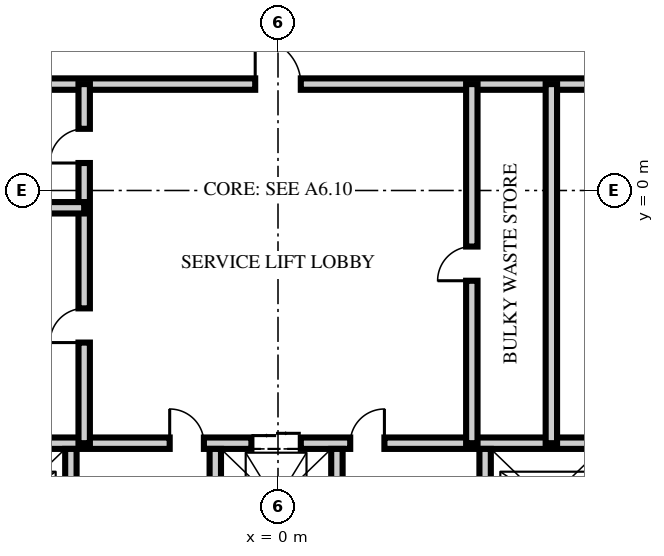
"""IFC4 building model, lengths in metres.
Left out: names, types, materials, properties, quantities, classifications, styles, units other than length and angle.
Written with IfcOpenShell. Run it as: python <this file> out.ifc"""

import sys

from ifc_helpers import new_model, si_unit, direction, frame, frame_2d, origin, place, context, subcontext, project, spatial, rectangle, extrude, element, fill, save


model = new_model("IFC4")
c1 = context("Model", 3, precision=1e-05, world=origin(), true_north=direction((0.0, 1.0)))
c2 = subcontext(c1, "Body", "Model", "MODEL_VIEW")
j1 = project(units=[si_unit("LENGTHUNIT", "METRE"), si_unit("PLANEANGLEUNIT", "RADIAN")], contexts=[c1])
p1 = place(None, origin())
s1 = spatial("IfcSite", under=j1, at=p1, CompositionType="ELEMENT")
p2 = place(p1, origin())
s2 = spatial("IfcBuilding", under=s1, at=p2, CompositionType="ELEMENT")
p3 = place(p2, frame((0.0, 0.0, 285.75)))
s3 = spatial("IfcBuildingStorey", under=s2, at=p3, CompositionType="ELEMENT", Elevation=285.75)
p4 = place(p3, frame((-8.5, -6.65, 0.0), z_axis=(0.0, 0.0, 1.0), x_axis=(1.0, 0.0, 0.0)))
e1 = element("IfcWall", 1, at=p4, inside=s3, PredefinedType="PARTITIONING", context=c2, shape_type="SweptSolid", body=[
    extrude(rectangle(XDim=17.0, YDim=0.3, at=frame_2d((8.5, 0.0))), origin(), (0.0, 0.0, 1.0), 3.5),
])
p5 = place(p4, frame((7.8, 0.0, 0.0)))
e2 = element("IfcOpeningElement", 2, at=p5, cuts=e1, PredefinedType="OPENING", context=c2, shape_type="SweptSolid", body=[
    extrude(rectangle(XDim=1.3, YDim=2.4, at=frame_2d((0.65, 1.2))), frame((0.0, 0.16, 0.0), z_axis=(0.0, -1.0, 0.0), x_axis=(1.0, 0.0, 0.0)), (0.0, 0.0, 1.0), 0.32),
])
p6 = place(p4, frame((5.65, 0.0, 0.0)))
e3 = element("IfcOpeningElement", 3, at=p6, cuts=e1, PredefinedType="OPENING", context=c2, shape_type="SweptSolid", body=[
    extrude(rectangle(XDim=0.9, YDim=2.1, at=frame_2d((0.45, 1.05))), frame((0.0, 0.16, 0.0), z_axis=(0.0, -1.0, 0.0), x_axis=(1.0, 0.0, 0.0)), (0.0, 0.0, 1.0), 0.32),
])
p7 = place(p4, frame((10.4, 0.0, 0.0)))
e4 = element("IfcOpeningElement", 4, at=p7, cuts=e1, PredefinedType="OPENING", context=c2, shape_type="SweptSolid", body=[
    extrude(rectangle(XDim=0.9, YDim=2.1, at=frame_2d((0.45, 1.05))), frame((0.0, 0.16, 0.0), z_axis=(0.0, -1.0, 0.0), x_axis=(1.0, 0.0, 0.0)), (0.0, 0.0, 1.0), 0.32),
])
for number, where, z_axis, x_axis in (
    (5, (-5.45, -11.35, 0.0), (0.0, 0.0, 1.0), (0.0, 1.0, 0.0)),
    (6, (-1.65, -11.35, 0.0), (0.0, 0.0, 1.0), (0.0, 1.0, 0.0)),
    (7, (1.55, -11.35, 0.0), (0.0, 0.0, 1.0), (0.0, 1.0, 0.0)),
    (8, (5.45, -11.35, 0.0), (0.0, 0.0, 1.0), (0.0, 1.0, 0.0)),
):
    element("IfcWall", number, at=place(p3, frame(where, z_axis=z_axis, x_axis=x_axis)), inside=s3, PredefinedType="PARTITIONING", context=c2, shape_type="SweptSolid", body=[
        extrude(rectangle(XDim=4.55, YDim=0.3, at=frame_2d((2.275, 0.0))), origin(), (0.0, 0.0, 1.0), 3.5),
    ])
p8 = place(p3, frame((-10.65, 2.8, 0.0), z_axis=(0.0, 0.0, 1.0), x_axis=(1.0, 0.0, 0.0)))
e9 = element("IfcWall", 9, at=p8, inside=s3, PredefinedType="PARTITIONING", context=c2, shape_type="SweptSolid", body=[
    extrude(rectangle(XDim=21.3, YDim=0.3, at=frame_2d((10.65, 0.0))), origin(), (0.0, 0.0, 1.0), 3.5),
])
p9 = place(p8, frame((10.05, 0.0, 0.0)))
e10 = element("IfcOpeningElement", 10, at=p9, cuts=e9, PredefinedType="OPENING", context=c2, shape_type="SweptSolid", body=[
    extrude(rectangle(XDim=1.2, YDim=2.1, at=frame_2d((0.6, 1.05))), frame((0.0, 0.16, 0.0), z_axis=(0.0, -1.0, 0.0), x_axis=(1.0, 0.0, 0.0)), (0.0, 0.0, 1.0), 0.32),
])
p10 = place(p8, frame((19.121, 0.0, 0.0)))
e11 = element("IfcOpeningElement", 11, at=p10, cuts=e9, PredefinedType="OPENING", context=c2, shape_type="SweptSolid", body=[
    extrude(rectangle(XDim=0.9, YDim=2.1, at=frame_2d((0.45, 1.05))), frame((0.0, 0.16, 0.0), z_axis=(0.0, -1.0, 0.0), x_axis=(1.0, 0.0, 0.0)), (0.0, 0.0, 1.0), 0.32),
])
p11 = place(p3, frame((-5.1, -6.65, 0.0), z_axis=(0.0, 0.0, 1.0), x_axis=(0.0, 1.0, 0.0)))
e12 = element("IfcWall", 12, at=p11, inside=s3, PredefinedType="PARTITIONING", context=c2, shape_type="SweptSolid", body=[
    extrude(rectangle(XDim=9.45, YDim=0.3, at=frame_2d((4.725, 0.0))), origin(), (0.0, 0.0, 1.0), 3.5),
])
p12 = place(p11, frame((2.648, 0.0, 0.0)))
e13 = element("IfcOpeningElement", 13, at=p12, cuts=e12, PredefinedType="OPENING", context=c2, shape_type="SweptSolid", body=[
    extrude(rectangle(XDim=0.9, YDim=2.1, at=frame_2d((0.45, 1.05))), frame((0.0, 0.16, 0.0), z_axis=(0.0, -1.0, 0.0), x_axis=(1.0, 0.0, 0.0)), (0.0, 0.0, 1.0), 0.32),
])
p13 = place(p11, frame((7.373, 0.0, 0.0)))
e14 = element("IfcOpeningElement", 14, at=p13, cuts=e12, PredefinedType="OPENING", context=c2, shape_type="SweptSolid", body=[
    extrude(rectangle(XDim=0.9, YDim=2.1, at=frame_2d((0.45, 1.05))), frame((0.0, 0.16, 0.0), z_axis=(0.0, -1.0, 0.0), x_axis=(1.0, 0.0, 0.0)), (0.0, 0.0, 1.0), 0.32),
])
p14 = place(p3, frame((5.1, -6.65, 0.0), z_axis=(0.0, 0.0, 1.0), x_axis=(0.0, 1.0, 0.0)))
e15 = element("IfcWall", 15, at=p14, inside=s3, PredefinedType="PARTITIONING", context=c2, shape_type="SweptSolid", body=[
    extrude(rectangle(XDim=9.45, YDim=0.3, at=frame_2d((4.725, 0.0))), origin(), (0.0, 0.0, 1.0), 3.5),
])
p15 = place(p14, frame((4.275, 0.0, 0.0)))
e16 = element("IfcOpeningElement", 16, at=p15, cuts=e15, PredefinedType="OPENING", context=c2, shape_type="SweptSolid", body=[
    extrude(rectangle(XDim=0.9, YDim=2.1, at=frame_2d((0.45, 1.05))), frame((0.0, 0.16, 0.0), z_axis=(0.0, -1.0, 0.0), x_axis=(1.0, 0.0, 0.0)), (0.0, 0.0, 1.0), 0.32),
])
p16 = place(p3, frame((-10.65, -0.455, 0.0), z_axis=(0.0, 0.0, 1.0), x_axis=(1.0, 0.0, 0.0)))
e17 = element("IfcWall", 17, at=p16, inside=s3, PredefinedType="PARTITIONING", context=c2, shape_type="SweptSolid", body=[
    extrude(rectangle(XDim=5.55, YDim=0.3, at=frame_2d((2.775, 0.0))), origin(), (0.0, 0.0, 1.0), 3.5),
])
p17 = place(p3, frame((7.193, -6.65, 0.0), z_axis=(0.0, 0.0, 1.0), x_axis=(0.0, 1.0, 0.0)))
e18 = element("IfcWall", 18, at=p17, inside=s3, PredefinedType="PARTITIONING", context=c2, shape_type="SweptSolid", body=[
    extrude(rectangle(XDim=9.45, YDim=0.3, at=frame_2d((4.725, 0.0))), origin(), (0.0, 0.0, 1.0), 3.5),
])
p18 = place(p5, origin())
e19 = element("IfcDoor", 19, at=p18, inside=s3, OperationType="DOUBLE_DOOR_SLIDING", PredefinedType="DOOR", context=c2, shape_type="SweptSolid", body=[
    extrude(rectangle(XDim=1.3, YDim=2.4, at=frame_2d((0.65, 1.2))), frame((0.0, 0.025, 0.0), z_axis=(0.0, -1.0, 0.0), x_axis=(1.0, 0.0, 0.0)), (0.0, 0.0, 1.0), 0.05),
])
fill(e2, e19)
p19 = place(p9, origin())
e20 = element("IfcDoor", 20, at=p19, inside=s3, OperationType="SINGLE_SWING_LEFT", PredefinedType="DOOR", context=c2, shape_type="SweptSolid", body=[
    extrude(rectangle(XDim=1.2, YDim=2.1, at=frame_2d((0.6, 1.05))), frame((0.0, 0.025, 0.0), z_axis=(0.0, -1.0, 0.0), x_axis=(1.0, 0.0, 0.0)), (0.0, 0.0, 1.0), 0.05),
])
fill(e10, e20)
p20 = place(p6, origin())
e21 = element("IfcDoor", 21, at=p20, inside=s3, OperationType="SINGLE_SWING_LEFT", PredefinedType="DOOR", context=c2, shape_type="SweptSolid", body=[
    extrude(rectangle(XDim=0.9, YDim=2.1, at=frame_2d((0.45, 1.05))), frame((0.0, 0.025, 0.0), z_axis=(0.0, -1.0, 0.0), x_axis=(1.0, 0.0, 0.0)), (0.0, 0.0, 1.0), 0.05),
])
fill(e3, e21)
p21 = place(p7, origin())
e22 = element("IfcDoor", 22, at=p21, inside=s3, OperationType="SINGLE_SWING_RIGHT", PredefinedType="DOOR", context=c2, shape_type="SweptSolid", body=[
    extrude(rectangle(XDim=0.9, YDim=2.1, at=frame_2d((0.45, 1.05))), frame((0.0, 0.025, 0.0), z_axis=(0.0, -1.0, 0.0), x_axis=(1.0, 0.0, 0.0)), (0.0, 0.0, 1.0), 0.05),
])
fill(e4, e22)
p22 = place(p12, origin())
e23 = element("IfcDoor", 23, at=p22, inside=s3, OperationType="SINGLE_SWING_LEFT", PredefinedType="DOOR", context=c2, shape_type="SweptSolid", body=[
    extrude(rectangle(XDim=0.9, YDim=2.1, at=frame_2d((0.45, 1.05))), frame((0.0, 0.025, 0.0), z_axis=(0.0, -1.0, 0.0), x_axis=(1.0, 0.0, 0.0)), (0.0, 0.0, 1.0), 0.05),
])
fill(e13, e23)
p23 = place(p13, origin())
e24 = element("IfcDoor", 24, at=p23, inside=s3, OperationType="SINGLE_SWING_LEFT", PredefinedType="DOOR", context=c2, shape_type="SweptSolid", body=[
    extrude(rectangle(XDim=0.9, YDim=2.1, at=frame_2d((0.45, 1.05))), frame((0.0, 0.025, 0.0), z_axis=(0.0, -1.0, 0.0), x_axis=(1.0, 0.0, 0.0)), (0.0, 0.0, 1.0), 0.05),
])
fill(e14, e24)
p24 = place(p15, origin())
e25 = element("IfcDoor", 25, at=p24, inside=s3, OperationType="SINGLE_SWING_LEFT", PredefinedType="DOOR", context=c2, shape_type="SweptSolid", body=[
    extrude(rectangle(XDim=0.9, YDim=2.1, at=frame_2d((0.45, 1.05))), frame((0.0, 0.025, 0.0), z_axis=(0.0, -1.0, 0.0), x_axis=(1.0, 0.0, 0.0)), (0.0, 0.0, 1.0), 0.05),
])
fill(e16, e25)
save(model, sys.argv[1])
